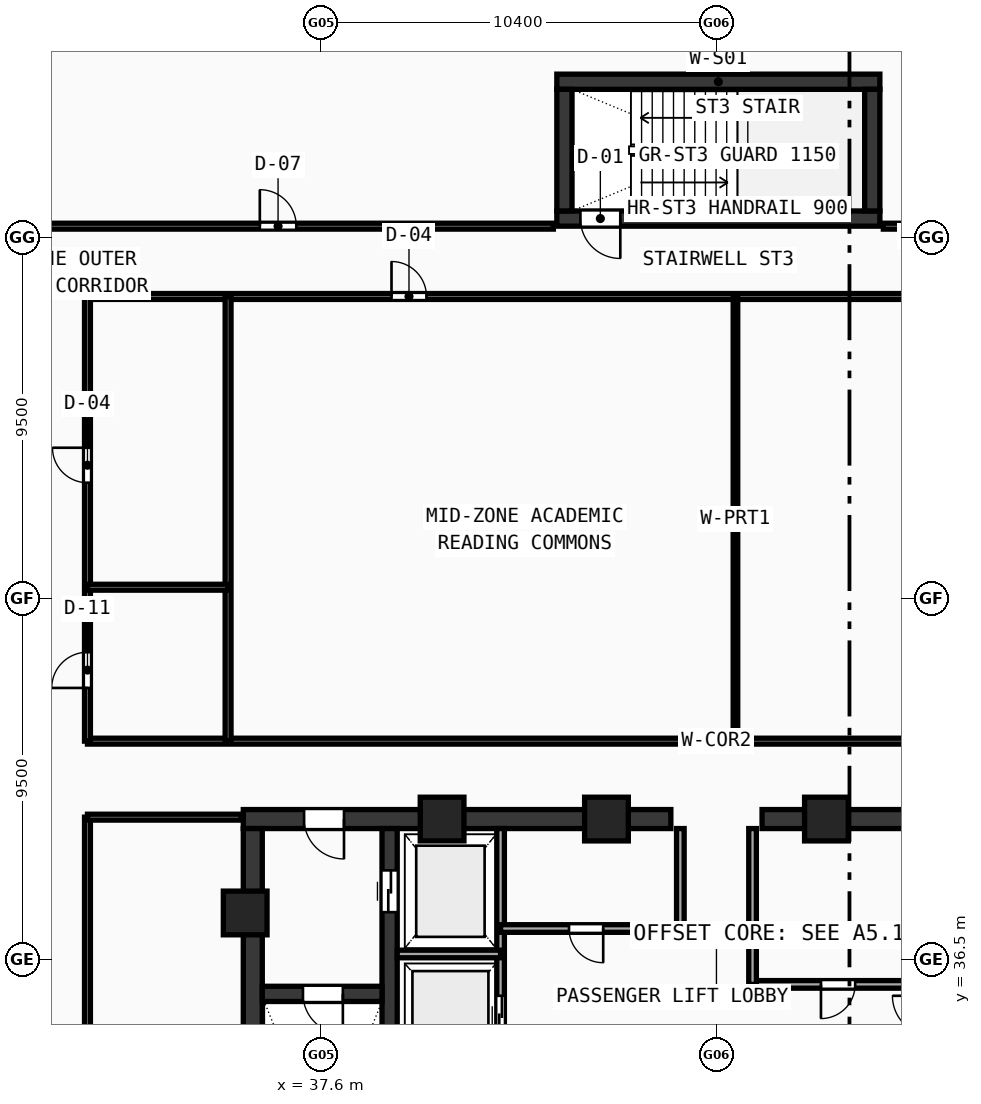
"""IFC4 building model, lengths in metres.
Left out: names, types, materials, properties, quantities, classifications, styles, units other than length and angle.
Written with IfcOpenShell. Run it as: python <this file> out.ifc"""

import sys

from ifc_helpers import new_model, si_unit, direction, frame, frame_2d, origin, origin_with_axes, origin_2d, place, context, subcontext, project, spatial, rectangle, hollow_rectangle, extrude, source, transform, mapped, element, fill, save


model = new_model("IFC4")
c1 = context("Model", 3, precision=1e-05, world=origin(), true_north=direction((0.0, 1.0)))
c2 = subcontext(c1, "Body", "Model", "MODEL_VIEW")
j1 = project(units=[si_unit("LENGTHUNIT", "METRE"), si_unit("PLANEANGLEUNIT", "RADIAN")], contexts=[c1])
p1 = place(None, origin())
s1 = spatial("IfcSite", under=j1, at=p1, CompositionType="ELEMENT")
p2 = place(p1, origin())
s2 = spatial("IfcBuilding", under=s1, at=p2, CompositionType="ELEMENT")
p3 = place(p2, frame((0.0, 0.0, 180.96)))
s3 = spatial("IfcBuildingStorey", under=s2, at=p3, CompositionType="ELEMENT", Elevation=180.96)
p4 = place(p3, frame((35.55, 40.2, 0.0), z_axis=(0.0, 0.0, 1.0), x_axis=(1.0, 0.0, 0.0)))
e1 = element("IfcWall", 1, at=p4, inside=s3, PredefinedType="SHEAR", context=c2, shape_type="SweptSolid", body=[
    extrude(rectangle(XDim=11.25, YDim=0.5, at=frame_2d((5.625, 0.0))), origin(), (0.0, 0.0, 1.0), 3.54),
])
p5 = place(p4, frame((1.6, 0.0, 0.0)))
e2 = element("IfcOpeningElement", 2, at=p5, cuts=e1, PredefinedType="OPENING", context=c2, shape_type="SweptSolid", body=[
    extrude(rectangle(XDim=1.05, YDim=2.1, at=frame_2d((0.525, 1.05))), frame((0.0, 0.26, 0.0), z_axis=(0.0, -1.0, 0.0), x_axis=(1.0, 0.0, 0.0)), (0.0, 0.0, 1.0), 0.52),
])
p6 = place(p3, frame((49.2, 40.2, 0.0), z_axis=(0.0, 0.0, 1.0), x_axis=(1.0, 0.0, 0.0)))
e3 = element("IfcWall", 3, at=p6, inside=s3, PredefinedType="SHEAR", context=c2, shape_type="SweptSolid", body=[
    extrude(rectangle(XDim=11.25, YDim=0.5, at=frame_2d((5.625, 0.0))), origin(), (0.0, 0.0, 1.0), 3.54),
])
p7 = place(p6, frame((8.6, 0.0, 0.0)))
e4 = element("IfcOpeningElement", 4, at=p7, cuts=e3, PredefinedType="OPENING", context=c2, shape_type="SweptSolid", body=[
    extrude(rectangle(XDim=1.05, YDim=2.1, at=frame_2d((0.525, 1.05))), frame((0.0, 0.26, 0.0), z_axis=(0.0, -1.0, 0.0), x_axis=(1.0, 0.0, 0.0)), (0.0, 0.0, 1.0), 0.52),
])
p8 = place(p3, frame((35.8, 27.75, 0.0), z_axis=(0.0, 0.0, 1.0), x_axis=(0.0, 1.0, 0.0)))
e5 = element("IfcWall", 5, at=p8, inside=s3, PredefinedType="SHEAR", context=c2, shape_type="SweptSolid", body=[
    extrude(rectangle(XDim=12.2, YDim=0.5, at=frame_2d((6.1, 0.0))), origin(), (0.0, 0.0, 1.0), 3.54),
])
p9 = place(p3, frame((39.4, 27.75, 0.0), z_axis=(0.0, 0.0, 1.0), x_axis=(0.0, 1.0, 0.0)))
e6 = element("IfcWall", 6, at=p9, inside=s3, PredefinedType="SHEAR", context=c2, shape_type="SweptSolid", body=[
    extrude(rectangle(XDim=12.2, YDim=0.4, at=frame_2d((6.1, 0.0))), origin(), (0.0, 0.0, 1.0), 3.54),
])
p10 = place(p9, frame((10.0, 0.0, 0.0)))
e7 = element("IfcOpeningElement", 7, at=p10, cuts=e6, PredefinedType="OPENING", context=c2, shape_type="SweptSolid", body=[
    extrude(rectangle(XDim=1.1, YDim=2.1, at=frame_2d((0.55, 1.05))), frame((0.0, 0.21, 0.0), z_axis=(0.0, -1.0, 0.0), x_axis=(1.0, 0.0, 0.0)), (0.0, 0.0, 1.0), 0.42),
])
p11 = place(p3, frame((36.05, 35.6, 0.0), z_axis=(0.0, 0.0, 1.0), x_axis=(1.0, 0.0, 0.0)))
e8 = element("IfcWall", 8, at=p11, inside=s3, PredefinedType="SHEAR", context=c2, shape_type="SweptSolid", body=[
    extrude(rectangle(XDim=3.15, YDim=0.4, at=frame_2d((1.575, 0.0))), origin(), (0.0, 0.0, 1.0), 3.54),
])
p12 = place(p11, frame((1.07, 0.0, 0.0)))
e9 = element("IfcOpeningElement", 9, at=p12, cuts=e8, PredefinedType="OPENING", context=c2, shape_type="SweptSolid", body=[
    extrude(rectangle(XDim=1.05, YDim=2.1, at=frame_2d((0.525, 1.05))), frame((0.0, 0.21, 0.0), z_axis=(0.0, -1.0, 0.0), x_axis=(1.0, 0.0, 0.0)), (0.0, 0.0, 1.0), 0.42),
])
p13 = place(p3, frame((43.8, 59.6, 0.0), z_axis=(0.0, 0.0, 1.0), x_axis=(1.0, 0.0, 0.0)))
e10 = element("IfcWall", 10, at=p13, inside=s3, PredefinedType="SHEAR", context=c2, shape_type="SweptSolid", body=[
    extrude(rectangle(XDim=8.5, YDim=0.4, at=frame_2d((4.25, 0.0))), origin(), (0.0, 0.0, 1.0), 3.54),
])
p14 = place(p3, frame((43.8, 56.0, 0.0), z_axis=(0.0, 0.0, 1.0), x_axis=(1.0, 0.0, 0.0)))
e11 = element("IfcWall", 11, at=p14, inside=s3, PredefinedType="SHEAR", context=c2, shape_type="SweptSolid", body=[
    extrude(rectangle(XDim=8.5, YDim=0.4, at=frame_2d((4.25, 0.0))), origin(), (0.0, 0.0, 1.0), 3.54),
])
p15 = place(p14, frame((0.62, 0.0, 0.0)))
e12 = element("IfcOpeningElement", 12, at=p15, cuts=e11, PredefinedType="OPENING", context=c2, shape_type="SweptSolid", body=[
    extrude(rectangle(XDim=1.05, YDim=2.1, at=frame_2d((0.525, 1.05))), frame((0.0, 0.21, 0.0), z_axis=(0.0, -1.0, 0.0), x_axis=(1.0, 0.0, 0.0)), (0.0, 0.0, 1.0), 0.42),
])
for number, where, z_axis, x_axis in (
    (13, (44.0, 56.2, 0.0), (0.0, 0.0, 1.0), (0.0, 1.0, 0.0)),
    (14, (52.1, 56.2, 0.0), (0.0, 0.0, 1.0), (0.0, 1.0, 0.0)),
):
    element("IfcWall", number, at=place(p3, frame(where, z_axis=z_axis, x_axis=x_axis)), inside=s3, PredefinedType="SHEAR", context=c2, shape_type="SweptSolid", body=[
        extrude(rectangle(XDim=3.2, YDim=0.4, at=frame_2d((1.6, 0.0))), origin(), (0.0, 0.0, 1.0), 3.54),
    ])
m1 = source(origin(), c2, "Body", "SweptSolid", [
    extrude(hollow_rectangle(XDim=1.15, YDim=1.15, WallThickness=0.048, at=origin_2d()), origin(), (0.0, 0.0, 1.0), 3.8),
])
for number, where, z_axis, x_axis in (
    (15, (50.894, 40.2, -0.26), (0.0, 0.0, 1.0), (1.0, 0.0, 0.0)),
    (16, (45.106, 40.2, -0.26), (0.0, 0.0, 1.0), (1.0, 0.0, 0.0)),
    (17, (40.781, 40.2, -0.26), (0.0, 0.0, 1.0), (1.0, 0.0, 0.0)),
    (18, (35.6, 37.729, -0.26), (0.0, 0.0, 1.0), (1.0, 0.0, 0.0)),
):
    element("IfcColumn", number, at=place(p3, frame(where, z_axis=z_axis, x_axis=x_axis)), inside=s3, PredefinedType="COLUMN", context=c2, shape_type="MappedRepresentation", body=[
        mapped(m1, transform((0.0, 0.0, 0.0), scale=1.0)),
    ])
p16 = place(p3, frame((42.32, 33.5, 0.0), z_axis=(0.0, 0.0, 1.0), x_axis=(0.0, 1.0, 0.0)))
e19 = element("IfcWall", 19, at=p16, inside=s3, PredefinedType="SOLIDWALL", context=c2, shape_type="SweptSolid", body=[
    extrude(rectangle(XDim=6.45, YDim=0.2, at=frame_2d((3.225, 0.0))), origin(), (0.0, 0.0, 1.0), 3.54),
])
p17 = place(p16, frame((1.0, 0.0, 0.0)))
e20 = element("IfcOpeningElement", 20, at=p17, cuts=e19, PredefinedType="OPENING", context=c2, shape_type="SweptSolid", body=[
    extrude(rectangle(XDim=1.05, YDim=2.1, at=frame_2d((0.525, 1.05))), frame((0.0, 0.11, 0.0), z_axis=(0.0, -1.0, 0.0), x_axis=(1.0, 0.0, 0.0)), (0.0, 0.0, 1.0), 0.22),
])
p18 = place(p3, frame((39.6, 36.65, 0.0), z_axis=(0.0, 0.0, 1.0), x_axis=(1.0, 0.0, 0.0)))
e21 = element("IfcWall", 21, at=p18, inside=s3, PredefinedType="SOLIDWALL", context=c2, shape_type="SweptSolid", body=[
    extrude(rectangle(XDim=2.72, YDim=0.2, at=frame_2d((1.36, 0.0))), origin(), (0.0, 0.0, 1.0), 3.54),
])
p19 = place(p3, frame((42.32, 37.32, 0.0), z_axis=(0.0, 0.0, 1.0), x_axis=(1.0, 0.0, 0.0)))
e22 = element("IfcWall", 22, at=p19, inside=s3, PredefinedType="SOLIDWALL", context=c2, shape_type="SweptSolid", body=[
    extrude(rectangle(XDim=4.73, YDim=0.2, at=frame_2d((2.365, 0.0))), origin(), (0.0, 0.0, 1.0), 3.54),
])
p20 = place(p19, frame((1.8, 0.0, 0.0)))
e23 = element("IfcOpeningElement", 23, at=p20, cuts=e22, PredefinedType="OPENING", context=c2, shape_type="SweptSolid", body=[
    extrude(rectangle(XDim=0.9, YDim=2.1, at=frame_2d((0.45, 1.05))), frame((0.0, 0.11, 0.0), z_axis=(0.0, -1.0, 0.0), x_axis=(1.0, 0.0, 0.0)), (0.0, 0.0, 1.0), 0.22),
])
p21 = place(p3, frame((48.95, 35.85, 0.0), z_axis=(0.0, 0.0, 1.0), x_axis=(1.0, 0.0, 0.0)))
e24 = element("IfcWall", 24, at=p21, inside=s3, PredefinedType="SOLIDWALL", context=c2, shape_type="SweptSolid", body=[
    extrude(rectangle(XDim=4.73, YDim=0.2, at=frame_2d((2.365, 0.0))), origin(), (0.0, 0.0, 1.0), 3.54),
])
p22 = place(p21, frame((1.8, 0.0, 0.0)))
e25 = element("IfcOpeningElement", 25, at=p22, cuts=e24, PredefinedType="OPENING", context=c2, shape_type="SweptSolid", body=[
    extrude(rectangle(XDim=0.9, YDim=2.1, at=frame_2d((0.45, 1.05))), frame((0.0, 0.11, 0.0), z_axis=(0.0, -1.0, 0.0), x_axis=(1.0, 0.0, 0.0)), (0.0, 0.0, 1.0), 0.22),
])
p23 = place(p3, frame((47.05, 37.32, 0.0), z_axis=(0.0, 0.0, 1.0), x_axis=(0.0, 1.0, 0.0)))
e26 = element("IfcWall", 26, at=p23, inside=s3, PredefinedType="SOLIDWALL", context=c2, shape_type="SweptSolid", body=[
    extrude(rectangle(XDim=2.63, YDim=0.2, at=frame_2d((1.315, 0.0))), origin(), (0.0, 0.0, 1.0), 3.54),
])
p24 = place(p3, frame((48.95, 35.85, 0.0), z_axis=(0.0, 0.0, 1.0), x_axis=(0.0, 1.0, 0.0)))
e27 = element("IfcWall", 27, at=p24, inside=s3, PredefinedType="SOLIDWALL", context=c2, shape_type="SweptSolid", body=[
    extrude(rectangle(XDim=4.1, YDim=0.2, at=frame_2d((2.05, 0.0))), origin(), (0.0, 0.0, 1.0), 3.54),
])
p25 = place(p3, frame((31.45, 42.25, 0.0), z_axis=(0.0, 0.0, 1.0), x_axis=(1.0, 0.0, 0.0)))
e28 = element("IfcWall", 28, at=p25, inside=s3, PredefinedType="PARTITIONING", context=c2, shape_type="SweptSolid", body=[
    extrude(rectangle(XDim=33.1, YDim=0.155, at=frame_2d((16.55, 0.0))), origin(), (0.0, 0.0, 1.0), 2.89),
])
p26 = place(p3, frame((31.45, 53.95, 0.0), z_axis=(0.0, 0.0, 1.0), x_axis=(1.0, 0.0, 0.0)))
e29 = element("IfcWall", 29, at=p26, inside=s3, PredefinedType="PARTITIONING", context=c2, shape_type="SweptSolid", body=[
    extrude(rectangle(XDim=33.1, YDim=0.155, at=frame_2d((16.55, 0.0))), origin(), (0.0, 0.0, 1.0), 2.89),
])
p27 = place(p26, frame((8.0, 0.0, 0.0)))
e30 = element("IfcOpeningElement", 30, at=p27, cuts=e29, PredefinedType="OPENING", context=c2, shape_type="SweptSolid", body=[
    extrude(rectangle(XDim=0.92, YDim=2.1, at=frame_2d((0.46, 1.05))), frame((0.0, 0.087, 0.0), z_axis=(0.0, -1.0, 0.0), x_axis=(1.0, 0.0, 0.0)), (0.0, 0.0, 1.0), 0.175),
])
p28 = place(p26, frame((21.55, 0.0, 0.0)))
e31 = element("IfcOpeningElement", 31, at=p28, cuts=e29, PredefinedType="OPENING", context=c2, shape_type="SweptSolid", body=[
    extrude(rectangle(XDim=0.92, YDim=2.1, at=frame_2d((0.46, 1.05))), frame((0.0, 0.087, 0.0), z_axis=(0.0, -1.0, 0.0), x_axis=(1.0, 0.0, 0.0)), (0.0, 0.0, 1.0), 0.175),
])
p29 = place(p3, frame((31.45, 42.25, 0.0), z_axis=(0.0, 0.0, 1.0), x_axis=(0.0, 1.0, 0.0)))
e32 = element("IfcWall", 32, at=p29, inside=s3, PredefinedType="PARTITIONING", context=c2, shape_type="SweptSolid", body=[
    extrude(rectangle(XDim=11.7, YDim=0.155, at=frame_2d((5.85, 0.0))), origin(), (0.0, 0.0, 1.0), 2.89),
])
p30 = place(p29, frame((1.4, 0.0, 0.0)))
e33 = element("IfcOpeningElement", 33, at=p30, cuts=e32, PredefinedType="OPENING", context=c2, shape_type="SweptSolid", body=[
    extrude(rectangle(XDim=0.94, YDim=2.1, at=frame_2d((0.47, 1.05))), frame((0.0, 0.087, 0.0), z_axis=(0.0, -1.0, 0.0), x_axis=(1.0, 0.0, 0.0)), (0.0, 0.0, 1.0), 0.175),
])
p31 = place(p29, frame((6.8, 0.0, 0.0)))
e34 = element("IfcOpeningElement", 34, at=p31, cuts=e32, PredefinedType="OPENING", context=c2, shape_type="SweptSolid", body=[
    extrude(rectangle(XDim=0.92, YDim=2.1, at=frame_2d((0.46, 1.05))), frame((0.0, 0.087, 0.0), z_axis=(0.0, -1.0, 0.0), x_axis=(1.0, 0.0, 0.0)), (0.0, 0.0, 1.0), 0.175),
])
p32 = place(p3, frame((35.15, 42.25, 0.0), z_axis=(0.0, 0.0, 1.0), x_axis=(0.0, 1.0, 0.0)))
e35 = element("IfcWall", 35, at=p32, inside=s3, PredefinedType="PARTITIONING", context=c2, shape_type="SweptSolid", body=[
    extrude(rectangle(XDim=11.7, YDim=0.155, at=frame_2d((5.85, 0.0))), origin(), (0.0, 0.0, 1.0), 2.89),
])
p33 = place(p3, frame((31.45, 46.3, 0.0), z_axis=(0.0, 0.0, 1.0), x_axis=(1.0, 0.0, 0.0)))
e36 = element("IfcWall", 36, at=p33, inside=s3, PredefinedType="PARTITIONING", context=c2, shape_type="SweptSolid", body=[
    extrude(rectangle(XDim=3.7, YDim=0.155, at=frame_2d((1.85, 0.0))), origin(), (0.0, 0.0, 1.0), 2.89),
])
p34 = place(p3, frame((48.5, 42.25, 0.0), z_axis=(0.0, 0.0, 1.0), x_axis=(0.0, 1.0, 0.0)))
e37 = element("IfcWall", 37, at=p34, inside=s3, PredefinedType="PARTITIONING", context=c2, shape_type="SweptSolid", body=[
    extrude(rectangle(XDim=11.7, YDim=0.12, at=frame_2d((5.85, 0.0))), origin(), (0.0, 0.0, 1.0), 3.14),
])
p35 = place(p3, frame((31.45, 23.65, 0.0), z_axis=(0.0, 0.0, 1.0), x_axis=(0.0, 1.0, 0.0)))
e38 = element("IfcWall", 38, at=p35, inside=s3, PredefinedType="PARTITIONING", context=c2, shape_type="SweptSolid", body=[
    extrude(rectangle(XDim=16.6, YDim=0.155, at=frame_2d((8.3, 0.0))), origin(), (0.0, 0.0, 1.0), 2.89),
])
p36 = place(p35, frame((7.5, 0.0, 0.0)))
e39 = element("IfcOpeningElement", 39, at=p36, cuts=e38, PredefinedType="OPENING", context=c2, shape_type="SweptSolid", body=[
    extrude(rectangle(XDim=0.9, YDim=2.08, at=frame_2d((0.45, 1.04))), frame((0.0, 0.087, 0.0), z_axis=(0.0, -1.0, 0.0), x_axis=(1.0, 0.0, 0.0)), (0.0, 0.0, 1.0), 0.175),
])
p37 = place(p3, frame((31.45, 40.25, 0.0), z_axis=(0.0, 0.0, 1.0), x_axis=(1.0, 0.0, 0.0)))
e40 = element("IfcWall", 40, at=p37, inside=s3, PredefinedType="PARTITIONING", context=c2, shape_type="SweptSolid", body=[
    extrude(rectangle(XDim=4.05, YDim=0.155, at=frame_2d((2.025, 0.0))), origin(), (0.0, 0.0, 1.0), 3.54),
])
p38 = place(p3, frame((29.6, 55.8, 0.0), z_axis=(0.0, 0.0, 1.0), x_axis=(1.0, 0.0, 0.0)))
e41 = element("IfcWall", 41, at=p38, inside=s3, PredefinedType="PARTITIONING", context=c2, shape_type="SweptSolid", body=[
    extrude(rectangle(XDim=14.109, YDim=0.155, at=frame_2d((7.054, 0.0))), origin(), (0.0, 0.0, 1.0), 2.89),
])
p39 = place(p38, frame((6.385, 0.0, 0.0)))
e42 = element("IfcOpeningElement", 42, at=p39, cuts=e41, PredefinedType="OPENING", context=c2, shape_type="SweptSolid", body=[
    extrude(rectangle(XDim=0.96, YDim=2.12, at=frame_2d((0.48, 1.06))), frame((0.0, 0.087, 0.0), z_axis=(0.0, -1.0, 0.0), x_axis=(1.0, 0.0, 0.0)), (0.0, 0.0, 1.0), 0.175),
])
p40 = place(p3, frame((52.391, 55.8, 0.0), z_axis=(0.0, 0.0, 1.0), x_axis=(1.0, 0.0, 0.0)))
e43 = element("IfcWall", 43, at=p40, inside=s3, PredefinedType="PARTITIONING", context=c2, shape_type="SweptSolid", body=[
    extrude(rectangle(XDim=5.229, YDim=0.155, at=frame_2d((2.614, 0.0))), origin(), (0.0, 0.0, 1.0), 2.89),
])
m2 = source(origin(), c2, "Body", "SweptSolid", [
    extrude(rectangle(XDim=1.05, YDim=2.1, at=frame_2d((0.525, 1.05))), frame((0.0, 0.025, 0.0), z_axis=(0.0, -1.0, 0.0), x_axis=(1.0, 0.0, 0.0)), (0.0, 0.0, 1.0), 0.05),
])
p41 = place(p12, frame((1.05, 0.0, 0.0), z_axis=(0.0, 0.0, 1.0), x_axis=(-1.0, 0.0, 0.0)))
e44 = element("IfcDoor", 44, at=p41, inside=s3, OperationType="SINGLE_SWING_LEFT", PredefinedType="DOOR", context=c2, shape_type="MappedRepresentation", body=[
    mapped(m2, transform((0.0, 0.0, 0.0), scale=1.0)),
])
fill(e9, e44)
p42 = place(p5, frame((1.05, 0.0, 0.0), z_axis=(0.0, 0.0, 1.0), x_axis=(-1.0, 0.0, 0.0)))
e45 = element("IfcDoor", 45, at=p42, inside=s3, OperationType="SINGLE_SWING_LEFT", PredefinedType="DOOR", context=c2, shape_type="MappedRepresentation", body=[
    mapped(m2, transform((0.0, 0.0, 0.0), scale=1.0)),
])
fill(e2, e45)
m3 = source(origin(), c2, "Body", "SweptSolid", [
    extrude(rectangle(XDim=1.1, YDim=2.1, at=frame_2d((0.55, 1.05))), frame((0.0, 0.025, 0.0), z_axis=(0.0, -1.0, 0.0), x_axis=(1.0, 0.0, 0.0)), (0.0, 0.0, 1.0), 0.05),
])
p43 = place(p10, frame((1.1, 0.0, 0.0), z_axis=(0.0, 0.0, 1.0), x_axis=(-1.0, 0.0, 0.0)))
e46 = element("IfcDoor", 46, at=p43, inside=s3, OperationType="DOUBLE_DOOR_SLIDING", PredefinedType="DOOR", context=c2, shape_type="MappedRepresentation", body=[
    mapped(m3, transform((0.0, 0.0, 0.0), scale=1.0)),
])
fill(e7, e46)
p44 = place(p17, origin_with_axes())
e47 = element("IfcDoor", 47, at=p44, inside=s3, OperationType="DOUBLE_DOOR_SLIDING", PredefinedType="DOOR", context=c2, shape_type="MappedRepresentation", body=[
    mapped(m2, transform((0.0, 0.0, 0.0), scale=1.0)),
])
fill(e20, e47)
m4 = source(origin(), c2, "Body", "SweptSolid", [
    extrude(rectangle(XDim=0.9, YDim=2.1, at=frame_2d((0.45, 1.05))), frame((0.0, 0.025, 0.0), z_axis=(0.0, -1.0, 0.0), x_axis=(1.0, 0.0, 0.0)), (0.0, 0.0, 1.0), 0.05),
])
p45 = place(p20, frame((0.9, 0.0, 0.0), z_axis=(0.0, 0.0, 1.0), x_axis=(-1.0, 0.0, 0.0)))
e48 = element("IfcDoor", 48, at=p45, inside=s3, OperationType="SINGLE_SWING_LEFT", PredefinedType="DOOR", context=c2, shape_type="MappedRepresentation", body=[
    mapped(m4, transform((0.0, 0.0, 0.0), scale=1.0)),
])
fill(e23, e48)
p46 = place(p22, frame((0.9, 0.0, 0.0), z_axis=(0.0, 0.0, 1.0), x_axis=(-1.0, 0.0, 0.0)))
e49 = element("IfcDoor", 49, at=p46, inside=s3, OperationType="SINGLE_SWING_RIGHT", PredefinedType="DOOR", context=c2, shape_type="MappedRepresentation", body=[
    mapped(m4, transform((0.0, 0.0, 0.0), scale=1.0)),
])
fill(e25, e49)
p47 = place(p15, frame((1.05, 0.0, 0.0), z_axis=(0.0, 0.0, 1.0), x_axis=(-1.0, 0.0, 0.0)))
e50 = element("IfcDoor", 50, at=p47, inside=s3, OperationType="SINGLE_SWING_LEFT", PredefinedType="DOOR", context=c2, shape_type="MappedRepresentation", body=[
    mapped(m2, transform((0.0, 0.0, 0.0), scale=1.0)),
])
fill(e12, e50)
m5 = source(origin(), c2, "Body", "SweptSolid", [
    extrude(rectangle(XDim=0.94, YDim=2.1, at=frame_2d((0.47, 1.05))), frame((0.0, 0.025, 0.0), z_axis=(0.0, -1.0, 0.0), x_axis=(1.0, 0.0, 0.0)), (0.0, 0.0, 1.0), 0.05),
])
p48 = place(p30, origin_with_axes())
e51 = element("IfcDoor", 51, at=p48, inside=s3, OperationType="SINGLE_SWING_LEFT", PredefinedType="DOOR", context=c2, shape_type="MappedRepresentation", body=[
    mapped(m5, transform((0.0, 0.0, 0.0), scale=1.0)),
])
fill(e33, e51)
m6 = source(origin(), c2, "Body", "SweptSolid", [
    extrude(rectangle(XDim=0.92, YDim=2.1, at=frame_2d((0.46, 1.05))), frame((0.0, 0.025, 0.0), z_axis=(0.0, -1.0, 0.0), x_axis=(1.0, 0.0, 0.0)), (0.0, 0.0, 1.0), 0.05),
])
p49 = place(p31, origin_with_axes())
e52 = element("IfcDoor", 52, at=p49, inside=s3, OperationType="SINGLE_SWING_RIGHT", PredefinedType="DOOR", context=c2, shape_type="MappedRepresentation", body=[
    mapped(m6, transform((0.0, 0.0, 0.0), scale=1.0)),
])
fill(e34, e52)
p50 = place(p27, origin_with_axes())
e53 = element("IfcDoor", 53, at=p50, inside=s3, OperationType="SINGLE_SWING_LEFT", PredefinedType="DOOR", context=c2, shape_type="MappedRepresentation", body=[
    mapped(m6, transform((0.0, 0.0, 0.0), scale=1.0)),
])
fill(e30, e53)
m7 = source(origin(), c2, "Body", "SweptSolid", [
    extrude(rectangle(XDim=0.96, YDim=2.12, at=frame_2d((0.48, 1.06))), frame((0.0, 0.025, 0.0), z_axis=(0.0, -1.0, 0.0), x_axis=(1.0, 0.0, 0.0)), (0.0, 0.0, 1.0), 0.05),
])
p51 = place(p39, origin_with_axes())
e54 = element("IfcDoor", 54, at=p51, inside=s3, OperationType="SINGLE_SWING_LEFT", PredefinedType="DOOR", context=c2, shape_type="MappedRepresentation", body=[
    mapped(m7, transform((0.0, 0.0, 0.0), scale=1.0)),
])
fill(e42, e54)
save(model, sys.argv[1])
